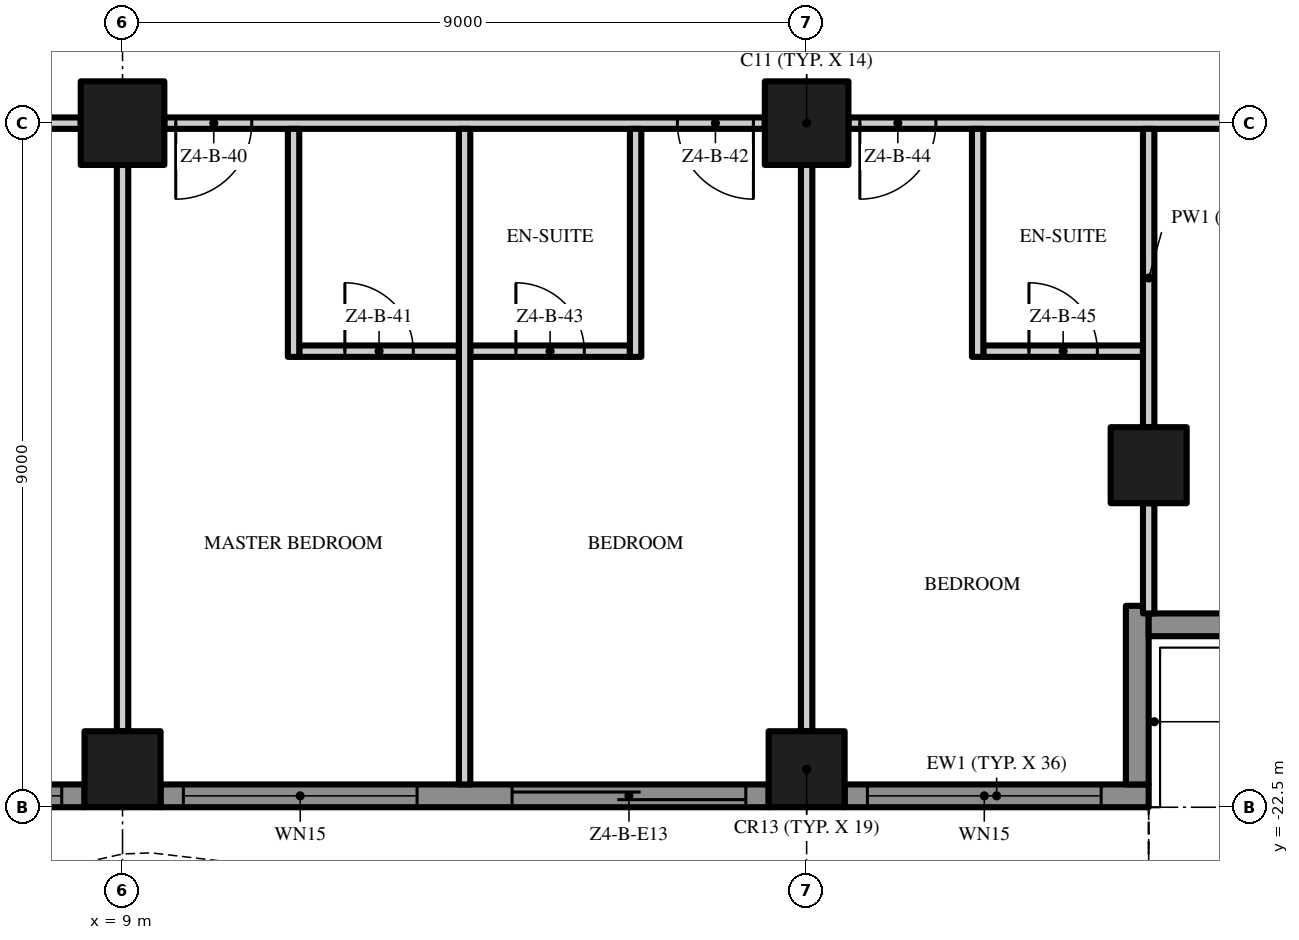
"""IFC4 building model, lengths in metres.
Left out: names, types, materials, properties, quantities, classifications, styles, units other than length and angle.
Written with IfcOpenShell. Run it as: python <this file> out.ifc"""

import sys

from ifc_helpers import new_model, si_unit, direction, frame, frame_2d, origin, origin_2d, place, context, subcontext, project, spatial, polyline, rectangle, outline, extrude, element, fill, save


model = new_model("IFC4")
c1 = context("Model", 3, precision=1e-05, world=origin(), true_north=direction((0.0, 1.0)))
c2 = subcontext(c1, "Body", "Model", "MODEL_VIEW")
j1 = project(units=[si_unit("LENGTHUNIT", "METRE"), si_unit("PLANEANGLEUNIT", "RADIAN")], contexts=[c1])
p1 = place(None, origin())
s1 = spatial("IfcSite", under=j1, at=p1, CompositionType="ELEMENT")
p2 = place(p1, origin())
s2 = spatial("IfcBuilding", under=s1, at=p2, CompositionType="ELEMENT")
p3 = place(p2, frame((0.0, 0.0, 199.6)))
s3 = spatial("IfcBuildingStorey", under=s2, at=p3, CompositionType="ELEMENT", Elevation=199.6)
p4 = place(p3, frame((18.0, -13.5, 0.0), z_axis=(0.0, 0.0, 1.0), x_axis=(1.0, 0.0, 0.0)))
e1 = element("IfcColumn", 1, at=p4, inside=s3, PredefinedType="COLUMN", context=c2, shape_type="SweptSolid", body=[
    extrude(rectangle(XDim=1.1, YDim=1.1, at=origin_2d()), origin(), (0.0, 0.0, 1.0), 3.5),
])
for number, where, z_axis, x_axis in (
    (2, (18.0, -22.0, 0.0), (0.0, 0.0, 1.0), (1.0, 0.0, 0.0)),
    (3, (22.5, -18.0, 0.0), (0.0, 0.0, 1.0), (1.0, 0.0, 0.0)),
):
    element("IfcColumn", number, at=place(p3, frame(where, z_axis=z_axis, x_axis=x_axis)), inside=s3, PredefinedType="COLUMN", context=c2, shape_type="SweptSolid", body=[
        extrude(rectangle(XDim=1.0, YDim=1.0, at=origin_2d()), origin(), (0.0, 0.0, 1.0), 3.5),
    ])
p5 = place(p3, frame((9.0, -13.5, 0.0), z_axis=(0.0, 0.0, 1.0), x_axis=(1.0, 0.0, 0.0)))
e4 = element("IfcColumn", 4, at=p5, inside=s3, PredefinedType="COLUMN", context=c2, shape_type="SweptSolid", body=[
    extrude(rectangle(XDim=1.1, YDim=1.1, at=origin_2d()), origin(), (0.0, 0.0, 1.0), 3.5),
])
p6 = place(p3, frame((9.0, -22.0, 0.0), z_axis=(0.0, 0.0, 1.0), x_axis=(1.0, 0.0, 0.0)))
e5 = element("IfcColumn", 5, at=p6, inside=s3, PredefinedType="COLUMN", context=c2, shape_type="SweptSolid", body=[
    extrude(rectangle(XDim=1.0, YDim=1.0, at=origin_2d()), origin(), (0.0, 0.0, 1.0), 3.5),
])
p7 = place(p3, frame((8.5, -22.35, 0.0), z_axis=(0.0, 0.0, 1.0), x_axis=(-1.0, 0.0, 0.0)))
e6 = element("IfcWall", 6, at=p7, inside=s3, PredefinedType="SOLIDWALL", context=c2, shape_type="SweptSolid", body=[
    extrude(rectangle(XDim=8.0, YDim=0.3, at=frame_2d((4.0, 0.0))), origin(), (0.0, 0.0, 1.0), 3.5),
])
p8 = place(p7, frame((4.625, 0.0, 0.0)))
e7 = element("IfcOpeningElement", 7, at=p8, cuts=e6, PredefinedType="OPENING", context=c2, shape_type="SweptSolid", body=[
    extrude(rectangle(XDim=3.075, YDim=2.4, at=frame_2d((1.538, 1.2))), frame((0.0, 0.16, 0.0), z_axis=(0.0, -1.0, 0.0), x_axis=(1.0, 0.0, 0.0)), (0.0, 0.0, 1.0), 0.32),
])
p9 = place(p7, frame((0.3, 0.0, 0.45)))
e8 = element("IfcOpeningElement", 8, at=p9, cuts=e6, PredefinedType="OPENING", context=c2, shape_type="SweptSolid", body=[
    extrude(rectangle(XDim=3.075, YDim=2.65, at=frame_2d((1.538, 1.325))), frame((0.0, 0.16, 0.0), z_axis=(0.0, -1.0, 0.0), x_axis=(1.0, 0.0, 0.0)), (0.0, 0.0, 1.0), 0.32),
])
p10 = place(p3, frame((17.5, -22.35, 0.0), z_axis=(0.0, 0.0, 1.0), x_axis=(-1.0, 0.0, 0.0)))
e9 = element("IfcWall", 9, at=p10, inside=s3, PredefinedType="SOLIDWALL", context=c2, shape_type="SweptSolid", body=[
    extrude(rectangle(XDim=8.0, YDim=0.3, at=frame_2d((4.0, 0.0))), origin(), (0.0, 0.0, 1.0), 3.5),
])
p11 = place(p10, frame((4.625, 0.0, 0.45)))
e10 = element("IfcOpeningElement", 10, at=p11, cuts=e9, PredefinedType="OPENING", context=c2, shape_type="SweptSolid", body=[
    extrude(rectangle(XDim=3.075, YDim=2.65, at=frame_2d((1.538, 1.325))), frame((0.0, 0.16, 0.0), z_axis=(0.0, -1.0, 0.0), x_axis=(1.0, 0.0, 0.0)), (0.0, 0.0, 1.0), 0.32),
])
p12 = place(p10, frame((0.3, 0.0, 0.0)))
e11 = element("IfcOpeningElement", 11, at=p12, cuts=e9, PredefinedType="OPENING", context=c2, shape_type="SweptSolid", body=[
    extrude(rectangle(XDim=3.075, YDim=2.4, at=frame_2d((1.538, 1.2))), frame((0.0, 0.16, 0.0), z_axis=(0.0, -1.0, 0.0), x_axis=(1.0, 0.0, 0.0)), (0.0, 0.0, 1.0), 0.32),
])
p13 = place(p3, frame((22.5, -22.35, 0.0), z_axis=(0.0, 0.0, 1.0), x_axis=(-1.0, 0.0, 0.0)))
e12 = element("IfcWall", 12, at=p13, inside=s3, PredefinedType="SOLIDWALL", context=c2, shape_type="SweptSolid", body=[
    extrude(rectangle(XDim=4.0, YDim=0.3, at=frame_2d((2.0, 0.0))), origin(), (0.0, 0.0, 1.0), 3.5),
])
p14 = place(p13, frame((0.625, 0.0, 0.45)))
e13 = element("IfcOpeningElement", 13, at=p14, cuts=e12, PredefinedType="OPENING", context=c2, shape_type="SweptSolid", body=[
    extrude(rectangle(XDim=3.075, YDim=2.65, at=frame_2d((1.538, 1.325))), frame((0.0, 0.16, 0.0), z_axis=(0.0, -1.0, 0.0), x_axis=(1.0, 0.0, 0.0)), (0.0, 0.0, 1.0), 0.32),
])
p15 = place(p3, frame((22.35, -19.85, 0.0), z_axis=(0.0, 0.0, 1.0), x_axis=(0.0, -1.0, 0.0)))
e14 = element("IfcWall", 14, at=p15, inside=s3, PredefinedType="SOLIDWALL", context=c2, shape_type="SweptSolid", body=[
    extrude(rectangle(XDim=2.35, YDim=0.3, at=frame_2d((1.175, 0.0))), origin(), (0.0, 0.0, 1.0), 3.5),
])
p16 = place(p3, frame((24.75, -20.1, 0.0), z_axis=(0.0, 0.0, 1.0), x_axis=(-1.0, 0.0, 0.0)))
e15 = element("IfcWall", 15, at=p16, inside=s3, PredefinedType="SOLIDWALL", context=c2, shape_type="SweptSolid", body=[
    extrude(rectangle(XDim=2.25, YDim=0.3, at=frame_2d((1.125, 0.0))), origin(), (0.0, 0.0, 1.0), 3.5),
])
p17 = place(p3, origin())
e16 = element("IfcWall", 16, at=p17, inside=s3, PredefinedType="USERDEFINED", context=c2, shape_type="SweptSolid", body=[
    extrude(outline(polyline([(-22.5, -23.451), (-21.0, -23.115), (-20.625, -23.1), (-19.5, -23.231), (-18.0, -23.755), (-16.5, -24.488), (-15.0, -25.149), (-13.5, -25.485), (-13.125, -25.5), (-12.0, -25.369), (-10.5, -24.845), (-9.0, -24.112), (-7.5, -23.451), (-6.0, -23.115), (-5.625, -23.1), (-4.5, -23.231), (-3.0, -23.755), (-1.5, -24.488), (0.0, -25.149), (1.5, -25.485), (1.875, -25.5), (3.0, -25.369), (4.5, -24.845), (6.0, -24.112), (7.5, -23.451), (9.0, -23.115), (9.375, -23.1), (10.5, -23.231), (12.0, -23.755), (13.5, -24.488), (15.0, -25.149), (16.5, -25.485), (16.875, -25.5), (18.0, -25.369), (19.5, -24.845), (21.0, -24.112), (22.5, -23.451), (22.399, -23.223), (20.895, -23.885), (19.404, -24.614), (17.944, -25.124), (16.865, -25.249), (16.533, -25.236), (15.079, -24.91), (13.605, -24.261), (12.096, -23.524), (10.556, -22.986), (9.385, -22.849), (8.967, -22.866), (7.421, -23.213), (5.895, -23.885), (4.404, -24.614), (2.944, -25.124), (1.865, -25.249), (1.533, -25.236), (0.079, -24.91), (-1.395, -24.261), (-2.904, -23.524), (-4.444, -22.986), (-5.615, -22.849), (-6.033, -22.866), (-7.579, -23.213), (-9.105, -23.885), (-10.596, -24.614), (-12.056, -25.124), (-13.135, -25.249), (-13.467, -25.236), (-14.921, -24.91), (-16.395, -24.261), (-17.904, -23.524), (-19.444, -22.986), (-20.615, -22.849), (-21.033, -22.866), (-22.555, -23.208), (-22.5, -23.451)])), origin(), (0.0, 0.0, 1.0), 0.9),
])
p18 = place(p3, frame((11.325, -16.5, 0.0), z_axis=(0.0, 0.0, 1.0), x_axis=(1.0, 0.0, 0.0)))
e17 = element("IfcWall", 17, at=p18, inside=s3, PredefinedType="PARTITIONING", context=c2, shape_type="SweptSolid", body=[
    extrude(rectangle(XDim=2.1, YDim=0.15, at=frame_2d((1.05, 0.0))), origin(), (0.0, 0.0, 1.0), 3.5),
])
p19 = place(p18, frame((0.6, 0.0, 0.0)))
e18 = element("IfcOpeningElement", 18, at=p19, cuts=e17, PredefinedType="OPENING", context=c2, shape_type="SweptSolid", body=[
    extrude(rectangle(XDim=0.9, YDim=2.1, at=frame_2d((0.45, 1.05))), frame((0.0, 0.085, 0.0), z_axis=(0.0, -1.0, 0.0), x_axis=(1.0, 0.0, 0.0)), (0.0, 0.0, 1.0), 0.17),
])
p20 = place(p3, frame((13.575, -16.5, 0.0), z_axis=(0.0, 0.0, 1.0), x_axis=(1.0, 0.0, 0.0)))
e19 = element("IfcWall", 19, at=p20, inside=s3, PredefinedType="PARTITIONING", context=c2, shape_type="SweptSolid", body=[
    extrude(rectangle(XDim=2.1, YDim=0.15, at=frame_2d((1.05, 0.0))), origin(), (0.0, 0.0, 1.0), 3.5),
])
p21 = place(p20, frame((0.6, 0.0, 0.0)))
e20 = element("IfcOpeningElement", 20, at=p21, cuts=e19, PredefinedType="OPENING", context=c2, shape_type="SweptSolid", body=[
    extrude(rectangle(XDim=0.9, YDim=2.1, at=frame_2d((0.45, 1.05))), frame((0.0, 0.085, 0.0), z_axis=(0.0, -1.0, 0.0), x_axis=(1.0, 0.0, 0.0)), (0.0, 0.0, 1.0), 0.17),
])
p22 = place(p3, frame((20.325, -16.5, 0.0), z_axis=(0.0, 0.0, 1.0), x_axis=(1.0, 0.0, 0.0)))
e21 = element("IfcWall", 21, at=p22, inside=s3, PredefinedType="PARTITIONING", context=c2, shape_type="SweptSolid", body=[
    extrude(rectangle(XDim=2.1, YDim=0.15, at=frame_2d((1.05, 0.0))), origin(), (0.0, 0.0, 1.0), 3.5),
])
p23 = place(p22, frame((0.6, 0.0, 0.0)))
e22 = element("IfcOpeningElement", 22, at=p23, cuts=e21, PredefinedType="OPENING", context=c2, shape_type="SweptSolid", body=[
    extrude(rectangle(XDim=0.9, YDim=2.1, at=frame_2d((0.45, 1.05))), frame((0.0, 0.085, 0.0), z_axis=(0.0, -1.0, 0.0), x_axis=(1.0, 0.0, 0.0)), (0.0, 0.0, 1.0), 0.17),
])
p24 = place(p3, frame((8.45, -13.5, 0.0), z_axis=(0.0, 0.0, 1.0), x_axis=(-1.0, 0.0, 0.0)))
e23 = element("IfcWall", 23, at=p24, inside=s3, PredefinedType="PARTITIONING", context=c2, shape_type="SweptSolid", body=[
    extrude(rectangle(XDim=7.9, YDim=0.15, at=frame_2d((3.95, 0.0))), origin(), (0.0, 0.0, 1.0), 3.5),
])
p25 = place(p24, frame((1.95, 0.0, 0.0)))
e24 = element("IfcOpeningElement", 24, at=p25, cuts=e23, PredefinedType="OPENING", context=c2, shape_type="SweptSolid", body=[
    extrude(rectangle(XDim=1.8, YDim=2.4, at=frame_2d((0.9, 1.2))), frame((0.0, 0.085, 0.0), z_axis=(0.0, -1.0, 0.0), x_axis=(1.0, 0.0, 0.0)), (0.0, 0.0, 1.0), 0.17),
])
p26 = place(p3, frame((17.45, -13.5, 0.0), z_axis=(0.0, 0.0, 1.0), x_axis=(-1.0, 0.0, 0.0)))
e25 = element("IfcWall", 25, at=p26, inside=s3, PredefinedType="PARTITIONING", context=c2, shape_type="SweptSolid", body=[
    extrude(rectangle(XDim=7.9, YDim=0.15, at=frame_2d((3.95, 0.0))), origin(), (0.0, 0.0, 1.0), 3.5),
])
p27 = place(p26, frame((6.75, 0.0, 0.0)))
e26 = element("IfcOpeningElement", 26, at=p27, cuts=e25, PredefinedType="OPENING", context=c2, shape_type="SweptSolid", body=[
    extrude(rectangle(XDim=1.0, YDim=2.4, at=frame_2d((0.5, 1.2))), frame((0.0, 0.085, 0.0), z_axis=(0.0, -1.0, 0.0), x_axis=(1.0, 0.0, 0.0)), (0.0, 0.0, 1.0), 0.17),
])
p28 = place(p26, frame((0.15, 0.0, 0.0)))
e27 = element("IfcOpeningElement", 27, at=p28, cuts=e25, PredefinedType="OPENING", context=c2, shape_type="SweptSolid", body=[
    extrude(rectangle(XDim=1.0, YDim=2.4, at=frame_2d((0.5, 1.2))), frame((0.0, 0.085, 0.0), z_axis=(0.0, -1.0, 0.0), x_axis=(1.0, 0.0, 0.0)), (0.0, 0.0, 1.0), 0.17),
])
p29 = place(p3, frame((26.0, -13.5, 0.0), z_axis=(0.0, 0.0, 1.0), x_axis=(-1.0, 0.0, 0.0)))
e28 = element("IfcWall", 28, at=p29, inside=s3, PredefinedType="PARTITIONING", context=c2, shape_type="SweptSolid", body=[
    extrude(rectangle(XDim=7.45, YDim=0.15, at=frame_2d((3.725, 0.0))), origin(), (0.0, 0.0, 1.0), 3.5),
])
p30 = place(p29, frame((6.3, 0.0, 0.0)))
e29 = element("IfcOpeningElement", 29, at=p30, cuts=e28, PredefinedType="OPENING", context=c2, shape_type="SweptSolid", body=[
    extrude(rectangle(XDim=1.0, YDim=2.4, at=frame_2d((0.5, 1.2))), frame((0.0, 0.085, 0.0), z_axis=(0.0, -1.0, 0.0), x_axis=(1.0, 0.0, 0.0)), (0.0, 0.0, 1.0), 0.17),
])
p31 = place(p29, frame((0.75, 0.0, 0.0)))
e30 = element("IfcOpeningElement", 30, at=p31, cuts=e28, PredefinedType="OPENING", context=c2, shape_type="SweptSolid", body=[
    extrude(rectangle(XDim=1.0, YDim=2.4, at=frame_2d((0.5, 1.2))), frame((0.0, 0.085, 0.0), z_axis=(0.0, -1.0, 0.0), x_axis=(1.0, 0.0, 0.0)), (0.0, 0.0, 1.0), 0.17),
])
p32 = place(p3, frame((9.0, -21.5, 0.0), z_axis=(0.0, 0.0, 1.0), x_axis=(0.0, 1.0, 0.0)))
e31 = element("IfcWall", 31, at=p32, inside=s3, PredefinedType="PARTITIONING", context=c2, shape_type="SweptSolid", body=[
    extrude(rectangle(XDim=7.45, YDim=0.15, at=frame_2d((3.725, 0.0))), origin(), (0.0, 0.0, 1.0), 3.5),
])
p33 = place(p3, frame((11.25, -16.575, 0.0), z_axis=(0.0, 0.0, 1.0), x_axis=(0.0, 1.0, 0.0)))
e32 = element("IfcWall", 32, at=p33, inside=s3, PredefinedType="PARTITIONING", context=c2, shape_type="SweptSolid", body=[
    extrude(rectangle(XDim=3.0, YDim=0.15, at=frame_2d((1.5, 0.0))), origin(), (0.0, 0.0, 1.0), 3.5),
])
p34 = place(p3, frame((13.5, -22.2, 0.0), z_axis=(0.0, 0.0, 1.0), x_axis=(0.0, 1.0, 0.0)))
e33 = element("IfcWall", 33, at=p34, inside=s3, PredefinedType="PARTITIONING", context=c2, shape_type="SweptSolid", body=[
    extrude(rectangle(XDim=8.625, YDim=0.15, at=frame_2d((4.312, 0.0))), origin(), (0.0, 0.0, 1.0), 3.5),
])
p35 = place(p3, frame((15.75, -16.575, 0.0), z_axis=(0.0, 0.0, 1.0), x_axis=(0.0, 1.0, 0.0)))
e34 = element("IfcWall", 34, at=p35, inside=s3, PredefinedType="PARTITIONING", context=c2, shape_type="SweptSolid", body=[
    extrude(rectangle(XDim=3.0, YDim=0.15, at=frame_2d((1.5, 0.0))), origin(), (0.0, 0.0, 1.0), 3.5),
])
p36 = place(p3, frame((18.0, -21.5, 0.0), z_axis=(0.0, 0.0, 1.0), x_axis=(0.0, 1.0, 0.0)))
e35 = element("IfcWall", 35, at=p36, inside=s3, PredefinedType="PARTITIONING", context=c2, shape_type="SweptSolid", body=[
    extrude(rectangle(XDim=7.45, YDim=0.15, at=frame_2d((3.725, 0.0))), origin(), (0.0, 0.0, 1.0), 3.5),
])
p37 = place(p3, frame((20.25, -16.575, 0.0), z_axis=(0.0, 0.0, 1.0), x_axis=(0.0, 1.0, 0.0)))
e36 = element("IfcWall", 36, at=p37, inside=s3, PredefinedType="PARTITIONING", context=c2, shape_type="SweptSolid", body=[
    extrude(rectangle(XDim=3.0, YDim=0.15, at=frame_2d((1.5, 0.0))), origin(), (0.0, 0.0, 1.0), 3.5),
])
p38 = place(p3, frame((22.5, -19.95, 0.0), z_axis=(0.0, 0.0, 1.0), x_axis=(0.0, 1.0, 0.0)))
e37 = element("IfcWall", 37, at=p38, inside=s3, PredefinedType="PARTITIONING", context=c2, shape_type="SweptSolid", body=[
    extrude(rectangle(XDim=1.45, YDim=0.15, at=frame_2d((0.725, 0.0))), origin(), (0.0, 0.0, 1.0), 3.5),
])
p39 = place(p3, frame((22.5, -17.5, 0.0), z_axis=(0.0, 0.0, 1.0), x_axis=(0.0, 1.0, 0.0)))
e38 = element("IfcWall", 38, at=p39, inside=s3, PredefinedType="PARTITIONING", context=c2, shape_type="SweptSolid", body=[
    extrude(rectangle(XDim=3.925, YDim=0.15, at=frame_2d((1.962, 0.0))), origin(), (0.0, 0.0, 1.0), 3.5),
])
p40 = place(p9, origin())
e39 = element("IfcWindow", 39, at=p40, inside=s3, PartitioningType="SINGLE_PANEL", PredefinedType="WINDOW", context=c2, shape_type="SweptSolid", body=[
    extrude(rectangle(XDim=3.075, YDim=2.65, at=frame_2d((1.538, 1.325))), frame((0.0, 0.03, 0.0), z_axis=(0.0, -1.0, 0.0), x_axis=(1.0, 0.0, 0.0)), (0.0, 0.0, 1.0), 0.06),
])
fill(e8, e39)
p41 = place(p11, origin())
e40 = element("IfcWindow", 40, at=p41, inside=s3, PartitioningType="SINGLE_PANEL", PredefinedType="WINDOW", context=c2, shape_type="SweptSolid", body=[
    extrude(rectangle(XDim=3.075, YDim=2.65, at=frame_2d((1.538, 1.325))), frame((0.0, 0.03, 0.0), z_axis=(0.0, -1.0, 0.0), x_axis=(1.0, 0.0, 0.0)), (0.0, 0.0, 1.0), 0.06),
])
fill(e10, e40)
p42 = place(p12, origin())
e41 = element("IfcDoor", 41, at=p42, inside=s3, OperationType="SINGLE_SWING_LEFT", PredefinedType="DOOR", context=c2, shape_type="SweptSolid", body=[
    extrude(rectangle(XDim=3.075, YDim=2.4, at=frame_2d((1.538, 1.2))), frame((0.0, 0.025, 0.0), z_axis=(0.0, -1.0, 0.0), x_axis=(1.0, 0.0, 0.0)), (0.0, 0.0, 1.0), 0.05),
])
fill(e11, e41)
p43 = place(p14, origin())
e42 = element("IfcWindow", 42, at=p43, inside=s3, PartitioningType="SINGLE_PANEL", PredefinedType="WINDOW", context=c2, shape_type="SweptSolid", body=[
    extrude(rectangle(XDim=3.075, YDim=2.65, at=frame_2d((1.538, 1.325))), frame((0.0, 0.03, 0.0), z_axis=(0.0, -1.0, 0.0), x_axis=(1.0, 0.0, 0.0)), (0.0, 0.0, 1.0), 0.06),
])
fill(e13, e42)
p44 = place(p27, origin())
e43 = element("IfcDoor", 43, at=p44, inside=s3, OperationType="SINGLE_SWING_RIGHT", PredefinedType="DOOR", context=c2, shape_type="SweptSolid", body=[
    extrude(rectangle(XDim=1.0, YDim=2.4, at=frame_2d((0.5, 1.2))), frame((0.0, 0.025, 0.0), z_axis=(0.0, -1.0, 0.0), x_axis=(1.0, 0.0, 0.0)), (0.0, 0.0, 1.0), 0.05),
])
fill(e26, e43)
p45 = place(p19, origin())
e44 = element("IfcDoor", 44, at=p45, inside=s3, OperationType="SINGLE_SWING_LEFT", PredefinedType="DOOR", context=c2, shape_type="SweptSolid", body=[
    extrude(rectangle(XDim=0.9, YDim=2.1, at=frame_2d((0.45, 1.05))), frame((0.0, 0.025, 0.0), z_axis=(0.0, -1.0, 0.0), x_axis=(1.0, 0.0, 0.0)), (0.0, 0.0, 1.0), 0.05),
])
fill(e18, e44)
p46 = place(p28, origin())
e45 = element("IfcDoor", 45, at=p46, inside=s3, OperationType="SINGLE_SWING_LEFT", PredefinedType="DOOR", context=c2, shape_type="SweptSolid", body=[
    extrude(rectangle(XDim=1.0, YDim=2.4, at=frame_2d((0.5, 1.2))), frame((0.0, 0.025, 0.0), z_axis=(0.0, -1.0, 0.0), x_axis=(1.0, 0.0, 0.0)), (0.0, 0.0, 1.0), 0.05),
])
fill(e27, e45)
p47 = place(p21, origin())
e46 = element("IfcDoor", 46, at=p47, inside=s3, OperationType="SINGLE_SWING_LEFT", PredefinedType="DOOR", context=c2, shape_type="SweptSolid", body=[
    extrude(rectangle(XDim=0.9, YDim=2.1, at=frame_2d((0.45, 1.05))), frame((0.0, 0.025, 0.0), z_axis=(0.0, -1.0, 0.0), x_axis=(1.0, 0.0, 0.0)), (0.0, 0.0, 1.0), 0.05),
])
fill(e20, e46)
p48 = place(p30, origin())
e47 = element("IfcDoor", 47, at=p48, inside=s3, OperationType="SINGLE_SWING_RIGHT", PredefinedType="DOOR", context=c2, shape_type="SweptSolid", body=[
    extrude(rectangle(XDim=1.0, YDim=2.4, at=frame_2d((0.5, 1.2))), frame((0.0, 0.025, 0.0), z_axis=(0.0, -1.0, 0.0), x_axis=(1.0, 0.0, 0.0)), (0.0, 0.0, 1.0), 0.05),
])
fill(e29, e47)
p49 = place(p23, origin())
e48 = element("IfcDoor", 48, at=p49, inside=s3, OperationType="SINGLE_SWING_LEFT", PredefinedType="DOOR", context=c2, shape_type="SweptSolid", body=[
    extrude(rectangle(XDim=0.9, YDim=2.1, at=frame_2d((0.45, 1.05))), frame((0.0, 0.025, 0.0), z_axis=(0.0, -1.0, 0.0), x_axis=(1.0, 0.0, 0.0)), (0.0, 0.0, 1.0), 0.05),
])
fill(e22, e48)
save(model, sys.argv[1])
